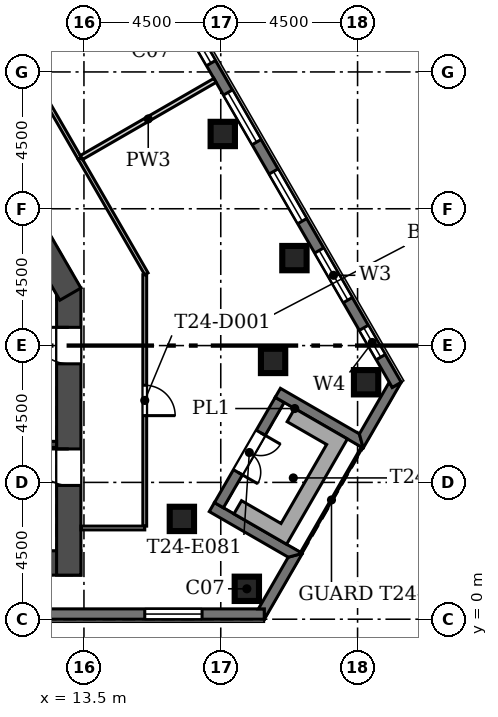
"""IFC4 building model, lengths in metres.
Left out: names, types, materials, properties, quantities, classifications, styles, units other than length and angle.
Written with IfcOpenShell. Run it as: python <this file> out.ifc"""

import sys

from ifc_helpers import new_model, si_unit, direction, frame, frame_2d, origin, origin_2d, place, context, subcontext, project, spatial, polyline, rectangle, outline, extrude, element, fill, save


model = new_model("IFC4")
c1 = context("Model", 3, precision=1e-05, world=origin(), true_north=direction((0.0, 1.0)))
c2 = subcontext(c1, "Body", "Model", "MODEL_VIEW")
j1 = project(units=[si_unit("LENGTHUNIT", "METRE"), si_unit("PLANEANGLEUNIT", "RADIAN")], contexts=[c1])
p1 = place(None, origin())
s1 = spatial("IfcSite", under=j1, at=p1, CompositionType="ELEMENT")
p2 = place(p1, origin())
s2 = spatial("IfcBuilding", under=s1, at=p2, CompositionType="ELEMENT")
p3 = place(p2, frame((0.0, 0.0, 335.1)))
s3 = spatial("IfcBuildingStorey", under=s2, at=p3, CompositionType="ELEMENT", Elevation=335.1)
for number, where, z_axis, x_axis in (
    (1, (18.858, 1.0, 0.0), (0.0, 0.0, 1.0), (1.0, 0.0, 0.0)),
    (2, (16.721, 3.299, 0.0), (0.0, 0.0, 1.0), (1.0, 0.0, 0.0)),
    (3, (19.721, 8.495, 0.0), (0.0, 0.0, 1.0), (1.0, 0.0, 0.0)),
    (4, (22.78, 7.794, 0.0), (0.0, 0.0, 1.0), (1.0, 0.0, 0.0)),
    (5, (20.423, 11.877, 0.0), (0.0, 0.0, 1.0), (1.0, 0.0, 0.0)),
    (6, (18.066, 15.96, 0.0), (0.0, 0.0, 1.0), (1.0, 0.0, 0.0)),
):
    element("IfcColumn", number, at=place(p3, frame(where, z_axis=z_axis, x_axis=x_axis)), inside=s3, PredefinedType="COLUMN", context=c2, shape_type="SweptSolid", body=[
        extrude(rectangle(XDim=0.8, YDim=0.8, at=origin_2d()), origin(), (0.0, 0.0, 1.0), 4.2),
    ])
p4 = place(p3, frame((-13.4, 1.85, 0.0), z_axis=(0.0, 0.0, 1.0), x_axis=(1.0, 0.0, 0.0)))
e7 = element("IfcWall", 7, at=p4, inside=s3, PredefinedType="SHEAR", context=c2, shape_type="SweptSolid", body=[
    extrude(rectangle(XDim=26.8, YDim=0.8, at=frame_2d((13.4, 0.0))), origin(), (0.0, 0.0, 1.0), 4.2),
])
p5 = place(p3, frame((13.0, 1.45, 0.0), z_axis=(0.0, 0.0, 1.0), x_axis=(0.0, 1.0, 0.0)))
e8 = element("IfcWall", 8, at=p5, inside=s3, PredefinedType="SHEAR", context=c2, shape_type="SweptSolid", body=[
    extrude(rectangle(XDim=9.442, YDim=0.8, at=frame_2d((4.721, 0.0))), origin(), (0.0, 0.0, 1.0), 4.2),
])
p6 = place(p5, frame((2.95, 0.0, 0.0)))
e9 = element("IfcOpeningElement", 9, at=p6, cuts=e8, PredefinedType="OPENING", context=c2, shape_type="SweptSolid", body=[
    extrude(rectangle(XDim=1.2, YDim=2.1, at=frame_2d((0.6, 1.05))), frame((0.0, 0.41, 0.0), z_axis=(0.0, -1.0, 0.0), x_axis=(1.0, 0.0, 0.0)), (0.0, 0.0, 1.0), 0.82),
])
p7 = place(p5, frame((6.95, 0.0, 0.0)))
e10 = element("IfcOpeningElement", 10, at=p7, cuts=e8, PredefinedType="OPENING", context=c2, shape_type="SweptSolid", body=[
    extrude(rectangle(XDim=1.2, YDim=2.1, at=frame_2d((0.6, 1.05))), frame((0.0, 0.41, 0.0), z_axis=(0.0, -1.0, 0.0), x_axis=(1.0, 0.0, 0.0)), (0.0, 0.0, 1.0), 0.82),
])
p8 = place(p3, frame((13.054, 10.692, 0.0), z_axis=(0.0, 0.0, 1.0), x_axis=(-0.500015780397, 0.866016292776, 0.0)))
e11 = element("IfcWall", 11, at=p8, inside=s3, PredefinedType="SHEAR", context=c2, shape_type="SweptSolid", body=[
    extrude(rectangle(XDim=8.67, YDim=0.8, at=frame_2d((4.335, 0.0))), origin(), (0.0, 0.0, 1.0), 4.2),
])
p9 = place(p3, frame((-19.435, 0.17, 0.0), z_axis=(0.0, 0.0, 1.0), x_axis=(1.0, 0.0, 0.0)))
e12 = element("IfcWall", 12, at=p9, inside=s3, PredefinedType="SOLIDWALL", context=c2, shape_type="SweptSolid", body=[
    extrude(rectangle(XDim=38.87, YDim=0.34, at=frame_2d((19.435, 0.0))), origin(), (0.0, 0.0, 1.0), 3.8),
])
p10 = place(p9, frame((1.935, 0.0, 0.9)))
e13 = element("IfcOpeningElement", 13, at=p10, cuts=e12, PredefinedType="OPENING", context=c2, shape_type="SweptSolid", body=[
    extrude(rectangle(XDim=1.885, YDim=2.6, at=frame_2d((0.942, 1.3))), frame((0.0, 0.18, 0.0), z_axis=(0.0, -1.0, 0.0), x_axis=(1.0, 0.0, 0.0)), (0.0, 0.0, 1.0), 0.36),
])
p11 = place(p9, frame((34.935, 0.0, 0.9)))
e14 = element("IfcOpeningElement", 14, at=p11, cuts=e12, PredefinedType="OPENING", context=c2, shape_type="SweptSolid", body=[
    extrude(rectangle(XDim=1.885, YDim=2.6, at=frame_2d((0.942, 1.3))), frame((0.0, 0.18, 0.0), z_axis=(0.0, -1.0, 0.0), x_axis=(1.0, 0.0, 0.0)), (0.0, 0.0, 1.0), 0.36),
])
p12 = place(p9, frame((11.735, 0.0, 0.6)))
e15 = element("IfcOpeningElement", 15, at=p12, cuts=e12, PredefinedType="OPENING", context=c2, shape_type="SweptSolid", body=[
    extrude(rectangle(XDim=0.6, YDim=3.0, at=frame_2d((0.3, 1.5))), frame((0.0, 0.18, 0.0), z_axis=(0.0, -1.0, 0.0), x_axis=(1.0, 0.0, 0.0)), (0.0, 0.0, 1.0), 0.36),
])
p13 = place(p9, frame((26.535, 0.0, 0.6)))
e16 = element("IfcOpeningElement", 16, at=p13, cuts=e12, PredefinedType="OPENING", context=c2, shape_type="SweptSolid", body=[
    extrude(rectangle(XDim=0.6, YDim=3.0, at=frame_2d((0.3, 1.5))), frame((0.0, 0.18, 0.0), z_axis=(0.0, -1.0, 0.0), x_axis=(1.0, 0.0, 0.0)), (0.0, 0.0, 1.0), 0.36),
])
p14 = place(p3, origin())
e17 = element("IfcWall", 17, at=p14, inside=s3, PredefinedType="SOLIDWALL", context=c2, shape_type="SweptSolid", body=[
    extrude(outline(polyline([(20.686, 2.166), (19.435, -0.001), (19.434, -0.001), (19.434, 0.339), (19.238, 0.339), (20.22, 2.041), (20.686, 2.166), (20.686, 2.166)])), origin(), (0.0, 0.0, 1.0), 3.8),
])
p15 = place(p3, origin())
e18 = element("IfcWall", 18, at=p15, inside=s3, PredefinedType="SOLIDWALL", context=c2, shape_type="SweptSolid", body=[
    extrude(outline(polyline([(17.622, 3.54), (17.792, 3.836), (18.087, 3.666), (20.686, 2.165), (20.686, 2.165), (20.22, 2.04), (17.622, 3.54)])), origin(), (0.0, 0.0, 1.0), 3.8),
])
p16 = place(p3, frame((17.94, 3.75, 0.0), z_axis=(0.0, 0.0, 1.0), x_axis=(0.49999894854, 0.866026010844, 0.0)))
e19 = element("IfcWall", 19, at=p16, inside=s3, PredefinedType="SOLIDWALL", context=c2, shape_type="SweptSolid", body=[
    extrude(rectangle(XDim=4.0, YDim=0.34, at=frame_2d((2.0, 0.0))), origin(), (0.0, 0.0, 1.0), 3.8),
])
p17 = place(p16, frame((1.25, 0.0, 0.0)))
e20 = element("IfcOpeningElement", 20, at=p17, cuts=e19, PredefinedType="OPENING", context=c2, shape_type="SweptSolid", body=[
    extrude(rectangle(XDim=1.5, YDim=2.4, at=frame_2d((0.75, 1.2))), frame((0.0, 0.18, 0.0), z_axis=(0.0, -1.0, 0.0), x_axis=(1.0, 0.0, 0.0)), (0.0, 0.0, 1.0), 0.36),
])
p18 = place(p3, origin())
e21 = element("IfcWall", 21, at=p18, inside=s3, PredefinedType="SOLIDWALL", context=c2, shape_type="SweptSolid", body=[
    extrude(outline(polyline([(22.686, 5.628), (20.087, 7.129), (19.792, 7.299), (19.962, 7.594), (22.561, 6.094), (22.686, 5.628), (22.686, 5.628)])), origin(), (0.0, 0.0, 1.0), 3.8),
])
p19 = place(p3, origin())
e22 = element("IfcWall", 22, at=p19, inside=s3, PredefinedType="SOLIDWALL", context=c2, shape_type="SweptSolid", body=[
    extrude(outline(polyline([(23.542, 7.795), (23.641, 7.625), (23.936, 7.795), (23.936, 7.795), (22.685, 5.628), (22.685, 5.628), (22.56, 6.094), (23.542, 7.795)])), origin(), (0.0, 0.0, 1.0), 3.8),
])
p20 = place(p3, frame((23.788, 7.709, 0.0), z_axis=(0.0, 0.0, 1.0), x_axis=(-0.500001731347, 0.866024404189, 0.0)))
e23 = element("IfcWall", 23, at=p20, inside=s3, PredefinedType="SOLIDWALL", context=c2, shape_type="SweptSolid", body=[
    extrude(rectangle(XDim=38.87, YDim=0.34, at=frame_2d((19.435, 0.0))), origin(), (0.0, 0.0, 1.0), 3.8),
])
p21 = place(p20, frame((3.218, 0.0, 0.9)))
e24 = element("IfcOpeningElement", 24, at=p21, cuts=e23, PredefinedType="OPENING", context=c2, shape_type="SweptSolid", body=[
    extrude(rectangle(XDim=1.885, YDim=2.6, at=frame_2d((0.942, 1.3))), frame((0.0, 0.18, 0.0), z_axis=(0.0, -1.0, 0.0), x_axis=(1.0, 0.0, 0.0)), (0.0, 0.0, 1.0), 0.36),
])
p22 = place(p20, frame((6.218, 0.0, 0.9)))
e25 = element("IfcOpeningElement", 25, at=p22, cuts=e23, PredefinedType="OPENING", context=c2, shape_type="SweptSolid", body=[
    extrude(rectangle(XDim=1.885, YDim=2.6, at=frame_2d((0.942, 1.3))), frame((0.0, 0.18, 0.0), z_axis=(0.0, -1.0, 0.0), x_axis=(1.0, 0.0, 0.0)), (0.0, 0.0, 1.0), 0.36),
])
p23 = place(p20, frame((9.218, 0.0, 0.9)))
e26 = element("IfcOpeningElement", 26, at=p23, cuts=e23, PredefinedType="OPENING", context=c2, shape_type="SweptSolid", body=[
    extrude(rectangle(XDim=1.885, YDim=2.6, at=frame_2d((0.942, 1.3))), frame((0.0, 0.18, 0.0), z_axis=(0.0, -1.0, 0.0), x_axis=(1.0, 0.0, 0.0)), (0.0, 0.0, 1.0), 0.36),
])
p24 = place(p20, frame((12.218, 0.0, 0.9)))
e27 = element("IfcOpeningElement", 27, at=p24, cuts=e23, PredefinedType="OPENING", context=c2, shape_type="SweptSolid", body=[
    extrude(rectangle(XDim=1.885, YDim=2.6, at=frame_2d((0.942, 1.3))), frame((0.0, 0.18, 0.0), z_axis=(0.0, -1.0, 0.0), x_axis=(1.0, 0.0, 0.0)), (0.0, 0.0, 1.0), 0.36),
])
p25 = place(p20, frame((15.218, 0.0, 0.9)))
e28 = element("IfcOpeningElement", 28, at=p25, cuts=e23, PredefinedType="OPENING", context=c2, shape_type="SweptSolid", body=[
    extrude(rectangle(XDim=1.885, YDim=2.6, at=frame_2d((0.942, 1.3))), frame((0.0, 0.18, 0.0), z_axis=(0.0, -1.0, 0.0), x_axis=(1.0, 0.0, 0.0)), (0.0, 0.0, 1.0), 0.36),
])
p26 = place(p20, frame((18.218, 0.0, 0.9)))
e29 = element("IfcOpeningElement", 29, at=p26, cuts=e23, PredefinedType="OPENING", context=c2, shape_type="SweptSolid", body=[
    extrude(rectangle(XDim=1.885, YDim=2.6, at=frame_2d((0.942, 1.3))), frame((0.0, 0.18, 0.0), z_axis=(0.0, -1.0, 0.0), x_axis=(1.0, 0.0, 0.0)), (0.0, 0.0, 1.0), 0.36),
])
p27 = place(p20, frame((21.218, 0.0, 0.9)))
e30 = element("IfcOpeningElement", 30, at=p27, cuts=e23, PredefinedType="OPENING", context=c2, shape_type="SweptSolid", body=[
    extrude(rectangle(XDim=1.885, YDim=2.6, at=frame_2d((0.942, 1.3))), frame((0.0, 0.18, 0.0), z_axis=(0.0, -1.0, 0.0), x_axis=(1.0, 0.0, 0.0)), (0.0, 0.0, 1.0), 0.36),
])
p28 = place(p20, frame((24.218, 0.0, 0.9)))
e31 = element("IfcOpeningElement", 31, at=p28, cuts=e23, PredefinedType="OPENING", context=c2, shape_type="SweptSolid", body=[
    extrude(rectangle(XDim=1.885, YDim=2.6, at=frame_2d((0.942, 1.3))), frame((0.0, 0.18, 0.0), z_axis=(0.0, -1.0, 0.0), x_axis=(1.0, 0.0, 0.0)), (0.0, 0.0, 1.0), 0.36),
])
p29 = place(p20, frame((27.218, 0.0, 0.9)))
e32 = element("IfcOpeningElement", 32, at=p29, cuts=e23, PredefinedType="OPENING", context=c2, shape_type="SweptSolid", body=[
    extrude(rectangle(XDim=1.885, YDim=2.6, at=frame_2d((0.942, 1.3))), frame((0.0, 0.18, 0.0), z_axis=(0.0, -1.0, 0.0), x_axis=(1.0, 0.0, 0.0)), (0.0, 0.0, 1.0), 0.36),
])
p30 = place(p20, frame((30.218, 0.0, 0.9)))
e33 = element("IfcOpeningElement", 33, at=p30, cuts=e23, PredefinedType="OPENING", context=c2, shape_type="SweptSolid", body=[
    extrude(rectangle(XDim=1.885, YDim=2.6, at=frame_2d((0.942, 1.3))), frame((0.0, 0.18, 0.0), z_axis=(0.0, -1.0, 0.0), x_axis=(1.0, 0.0, 0.0)), (0.0, 0.0, 1.0), 0.36),
])
p31 = place(p20, frame((33.218, 0.0, 0.9)))
e34 = element("IfcOpeningElement", 34, at=p31, cuts=e23, PredefinedType="OPENING", context=c2, shape_type="SweptSolid", body=[
    extrude(rectangle(XDim=1.885, YDim=2.6, at=frame_2d((0.942, 1.3))), frame((0.0, 0.18, 0.0), z_axis=(0.0, -1.0, 0.0), x_axis=(1.0, 0.0, 0.0)), (0.0, 0.0, 1.0), 0.36),
])
p32 = place(p20, frame((1.051, 0.0, 0.9)))
e35 = element("IfcOpeningElement", 35, at=p32, cuts=e23, PredefinedType="OPENING", context=c2, shape_type="SweptSolid", body=[
    extrude(rectangle(XDim=1.115, YDim=2.4, at=frame_2d((0.558, 1.2))), frame((0.0, 0.18, 0.0), z_axis=(0.0, -1.0, 0.0), x_axis=(1.0, 0.0, 0.0)), (0.0, 0.0, 1.0), 0.36),
])
p33 = place(p20, frame((36.429, 0.0, 0.9)))
e36 = element("IfcOpeningElement", 36, at=p33, cuts=e23, PredefinedType="OPENING", context=c2, shape_type="SweptSolid", body=[
    extrude(rectangle(XDim=1.115, YDim=2.4, at=frame_2d((0.558, 1.2))), frame((0.0, 0.18, 0.0), z_axis=(0.0, -1.0, 0.0), x_axis=(1.0, 0.0, 0.0)), (0.0, 0.0, 1.0), 0.36),
])
p34 = place(p3, origin())
e37 = element("IfcWall", 37, at=p34, inside=s3, PredefinedType="USERDEFINED", context=c2, shape_type="SweptSolid", body=[
    extrude(outline(polyline([(18.433, 3.465), (19.732, 2.715), (19.732, 2.715), (20.165, 2.465), (22.165, 5.929), (20.433, 6.929), (20.183, 6.496), (21.482, 5.746), (19.982, 3.148), (18.683, 3.898), (18.433, 3.465)])), origin(), (0.0, 0.0, 1.0), 1.1),
])
p35 = place(p3, frame((1.2, 5.75, -0.4), z_axis=(0.0, 0.0, 1.0), x_axis=(1.0, 0.0, 0.0)))
e38 = element("IfcWall", 38, at=p35, inside=s3, PredefinedType="SOLIDWALL", context=c2, shape_type="SweptSolid", body=[
    extrude(rectangle(XDim=11.4, YDim=0.2, at=frame_2d((5.7, 0.0))), origin(), (0.0, 0.0, 1.0), 4.2),
])
p36 = place(p3, frame((11.544, 18.306, 0.0), z_axis=(0.0, 0.0, 1.0), x_axis=(0.500007048974, -0.866021334019, 0.0)))
e39 = element("IfcWall", 39, at=p36, inside=s3, PredefinedType="PARTITIONING", context=c2, shape_type="SweptSolid", body=[
    extrude(rectangle(XDim=3.639, YDim=0.125, at=frame_2d((1.819, 0.0))), origin(), (0.0, 0.0, 1.0), 3.8),
])
p37 = place(p3, frame((13.364, 15.155, 0.0), z_axis=(0.0, 0.0, 1.0), x_axis=(0.499974900732, -0.866039894369, 0.0)))
e40 = element("IfcWall", 40, at=p37, inside=s3, PredefinedType="PARTITIONING", context=c2, shape_type="SweptSolid", body=[
    extrude(rectangle(XDim=4.381, YDim=0.125, at=frame_2d((2.19, 0.0))), origin(), (0.0, 0.0, 1.0), 3.8),
])
p38 = place(p3, frame((15.5, 11.33, 0.0), z_axis=(0.0, 0.0, 1.0), x_axis=(0.0, -1.0, 0.0)))
e41 = element("IfcWall", 41, at=p38, inside=s3, PredefinedType="PARTITIONING", context=c2, shape_type="SweptSolid", body=[
    extrude(rectangle(XDim=8.267, YDim=0.125, at=frame_2d((4.134, 0.0))), origin(), (0.0, 0.0, 1.0), 3.8),
])
p39 = place(p38, frame((3.634, 0.0, 0.0)))
e42 = element("IfcOpeningElement", 42, at=p39, cuts=e41, PredefinedType="OPENING", context=c2, shape_type="SweptSolid", body=[
    extrude(rectangle(XDim=1.0, YDim=2.1, at=frame_2d((0.5, 1.05))), frame((0.0, 0.073, 0.0), z_axis=(0.0, -1.0, 0.0), x_axis=(1.0, 0.0, 0.0)), (0.0, 0.0, 1.0), 0.145),
])
p40 = place(p3, frame((15.5, 3.0, 0.0), z_axis=(0.0, 0.0, 1.0), x_axis=(-1.0, 0.0, 0.0)))
e43 = element("IfcWall", 43, at=p40, inside=s3, PredefinedType="PARTITIONING", context=c2, shape_type="SweptSolid", body=[
    extrude(rectangle(XDim=2.1, YDim=0.125, at=frame_2d((1.05, 0.0))), origin(), (0.0, 0.0, 1.0), 3.8),
])
p41 = place(p3, frame((17.811, 17.722, 0.0), z_axis=(0.0, 0.0, 1.0), x_axis=(-0.86601005171, -0.50002658963, 0.0)))
e44 = element("IfcWall", 44, at=p41, inside=s3, PredefinedType="PARTITIONING", context=c2, shape_type="SweptSolid", body=[
    extrude(rectangle(XDim=5.073, YDim=0.15, at=frame_2d((2.536, 0.0))), origin(), (0.0, 0.0, 1.0), 3.8),
])
p42 = place(p11, origin())
e45 = element("IfcWindow", 45, at=p42, inside=s3, PartitioningType="SINGLE_PANEL", PredefinedType="WINDOW", context=c2, shape_type="SweptSolid", body=[
    extrude(rectangle(XDim=1.885, YDim=2.6, at=frame_2d((0.942, 1.3))), frame((0.0, 0.11, 0.0), z_axis=(0.0, -1.0, 0.0), x_axis=(1.0, 0.0, 0.0)), (0.0, 0.0, 1.0), 0.06),
])
fill(e14, e45)
p43 = place(p17, frame((1.5, 0.0, 0.0), z_axis=(0.0, 0.0, 1.0), x_axis=(-1.0, 0.0, 0.0)))
e46 = element("IfcDoor", 46, at=p43, inside=s3, OperationType="DOUBLE_DOOR_SINGLE_SWING", PredefinedType="DOOR", context=c2, shape_type="SweptSolid", body=[
    extrude(rectangle(XDim=1.5, YDim=2.4, at=frame_2d((0.75, 1.2))), frame((0.0, 0.025, 0.0), z_axis=(0.0, -1.0, 0.0), x_axis=(1.0, 0.0, 0.0)), (0.0, 0.0, 1.0), 0.05),
])
fill(e20, e46)
p44 = place(p21, origin())
e47 = element("IfcWindow", 47, at=p44, inside=s3, PartitioningType="SINGLE_PANEL", PredefinedType="WINDOW", context=c2, shape_type="SweptSolid", body=[
    extrude(rectangle(XDim=1.885, YDim=2.6, at=frame_2d((0.942, 1.3))), frame((0.0, 0.11, 0.0), z_axis=(0.0, -1.0, 0.0), x_axis=(1.0, 0.0, 0.0)), (0.0, 0.0, 1.0), 0.06),
])
fill(e24, e47)
p45 = place(p22, origin())
e48 = element("IfcWindow", 48, at=p45, inside=s3, PartitioningType="SINGLE_PANEL", PredefinedType="WINDOW", context=c2, shape_type="SweptSolid", body=[
    extrude(rectangle(XDim=1.885, YDim=2.6, at=frame_2d((0.942, 1.3))), frame((0.0, 0.11, 0.0), z_axis=(0.0, -1.0, 0.0), x_axis=(1.0, 0.0, 0.0)), (0.0, 0.0, 1.0), 0.06),
])
fill(e25, e48)
p46 = place(p23, origin())
e49 = element("IfcWindow", 49, at=p46, inside=s3, PartitioningType="SINGLE_PANEL", PredefinedType="WINDOW", context=c2, shape_type="SweptSolid", body=[
    extrude(rectangle(XDim=1.885, YDim=2.6, at=frame_2d((0.942, 1.3))), frame((0.0, 0.11, 0.0), z_axis=(0.0, -1.0, 0.0), x_axis=(1.0, 0.0, 0.0)), (0.0, 0.0, 1.0), 0.06),
])
fill(e26, e49)
p47 = place(p24, origin())
e50 = element("IfcWindow", 50, at=p47, inside=s3, PartitioningType="SINGLE_PANEL", PredefinedType="WINDOW", context=c2, shape_type="SweptSolid", body=[
    extrude(rectangle(XDim=1.885, YDim=2.6, at=frame_2d((0.942, 1.3))), frame((0.0, 0.11, 0.0), z_axis=(0.0, -1.0, 0.0), x_axis=(1.0, 0.0, 0.0)), (0.0, 0.0, 1.0), 0.06),
])
fill(e27, e50)
p48 = place(p32, origin())
e51 = element("IfcWindow", 51, at=p48, inside=s3, PartitioningType="SINGLE_PANEL", PredefinedType="WINDOW", context=c2, shape_type="SweptSolid", body=[
    extrude(rectangle(XDim=1.115, YDim=2.4, at=frame_2d((0.558, 1.2))), frame((0.0, 0.11, 0.0), z_axis=(0.0, -1.0, 0.0), x_axis=(1.0, 0.0, 0.0)), (0.0, 0.0, 1.0), 0.06),
])
fill(e35, e51)
p49 = place(p6, origin())
e52 = element("IfcDoor", 52, at=p49, inside=s3, OperationType="SINGLE_SWING_RIGHT", PredefinedType="DOOR", context=c2, shape_type="SweptSolid", body=[
    extrude(rectangle(XDim=1.2, YDim=2.1, at=frame_2d((0.6, 1.05))), frame((0.0, 0.025, 0.0), z_axis=(0.0, -1.0, 0.0), x_axis=(1.0, 0.0, 0.0)), (0.0, 0.0, 1.0), 0.05),
])
fill(e9, e52)
p50 = place(p7, origin())
e53 = element("IfcDoor", 53, at=p50, inside=s3, OperationType="SINGLE_SWING_RIGHT", PredefinedType="DOOR", context=c2, shape_type="SweptSolid", body=[
    extrude(rectangle(XDim=1.2, YDim=2.1, at=frame_2d((0.6, 1.05))), frame((0.0, 0.025, 0.0), z_axis=(0.0, -1.0, 0.0), x_axis=(1.0, 0.0, 0.0)), (0.0, 0.0, 1.0), 0.05),
])
fill(e10, e53)
p51 = place(p39, origin())
e54 = element("IfcDoor", 54, at=p51, inside=s3, OperationType="SINGLE_SWING_RIGHT", PredefinedType="DOOR", context=c2, shape_type="SweptSolid", body=[
    extrude(rectangle(XDim=1.0, YDim=2.1, at=frame_2d((0.5, 1.05))), frame((0.0, 0.025, 0.0), z_axis=(0.0, -1.0, 0.0), x_axis=(1.0, 0.0, 0.0)), (0.0, 0.0, 1.0), 0.05),
])
fill(e42, e54)
save(model, sys.argv[1])
